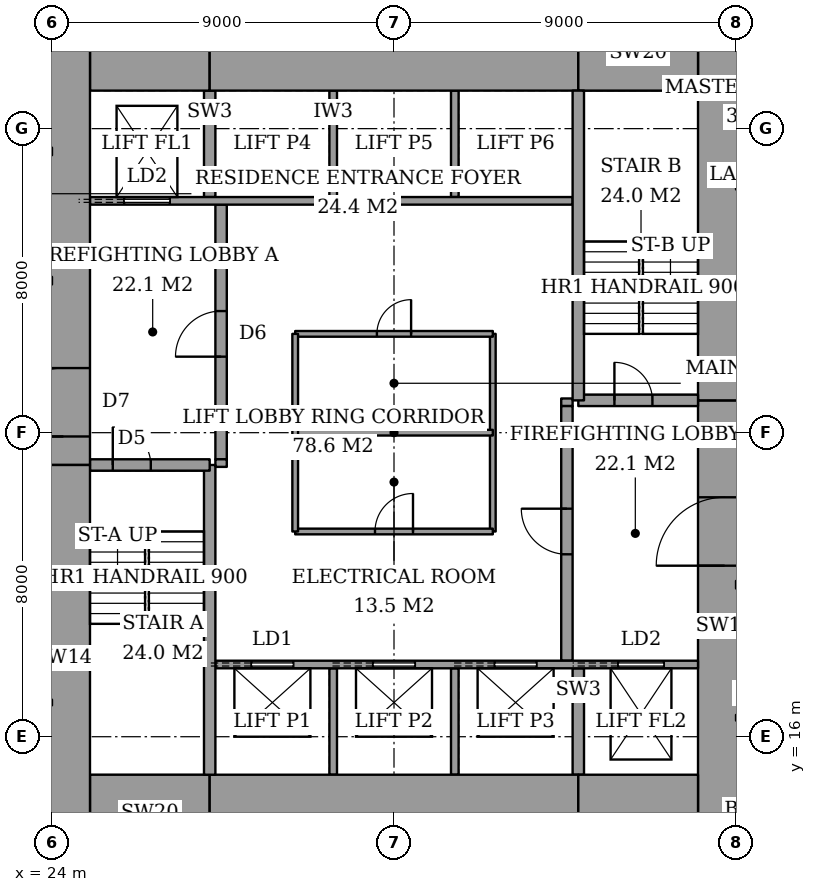
"""IFC4 building model, lengths in metres.
Left out: names, types, materials, properties, quantities, classifications, styles, units other than length and angle.
Written with IfcOpenShell. Run it as: python <this file> out.ifc"""

import sys

from ifc_helpers import new_model, si_unit, direction, frame, frame_2d, origin, place, context, subcontext, project, spatial, rectangle, extrude, element, fill, save


model = new_model("IFC4")
c1 = context("Model", 3, precision=1e-05, world=origin(), true_north=direction((0.0, 1.0)))
c2 = subcontext(c1, "Body", "Model", "MODEL_VIEW")
j1 = project(units=[si_unit("LENGTHUNIT", "METRE"), si_unit("PLANEANGLEUNIT", "RADIAN")], contexts=[c1])
p1 = place(None, origin())
s1 = spatial("IfcSite", under=j1, at=p1, CompositionType="ELEMENT")
p2 = place(p1, origin())
s2 = spatial("IfcBuilding", under=s1, at=p2, CompositionType="ELEMENT")
p3 = place(p2, frame((0.0, 0.0, 58.4)))
s3 = spatial("IfcBuildingStorey", under=s2, at=p3, CompositionType="ELEMENT", Elevation=58.4)
p4 = place(p3, frame((25.0, 14.0, 0.0), z_axis=(0.0, 0.0, 1.0), x_axis=(1.0, 0.0, 0.0)))
e1 = element("IfcWall", 1, at=p4, inside=s3, PredefinedType="SHEAR", context=c2, shape_type="SweptSolid", body=[
    extrude(rectangle(XDim=3.15, YDim=2.0, at=frame_2d((1.575, 0.0))), origin(), (0.0, 0.0, 1.0), 3.6),
])
p5 = place(p3, frame((28.15, 14.0, 0.0), z_axis=(0.0, 0.0, 1.0), x_axis=(1.0, 0.0, 0.0)))
e2 = element("IfcWall", 2, at=p5, inside=s3, PredefinedType="SHEAR", context=c2, shape_type="SweptSolid", body=[
    extrude(rectangle(XDim=9.7, YDim=2.0, at=frame_2d((4.85, 0.0))), origin(), (0.0, 0.0, 1.0), 3.6),
])
for number, where, z_axis, x_axis in (
    (3, (37.85, 14.0, 0.0), (0.0, 0.0, 1.0), (1.0, 0.0, 0.0)),
    (4, (25.0, 34.0, 0.0), (0.0, 0.0, 1.0), (1.0, 0.0, 0.0)),
):
    element("IfcWall", number, at=place(p3, frame(where, z_axis=z_axis, x_axis=x_axis)), inside=s3, PredefinedType="SHEAR", context=c2, shape_type="SweptSolid", body=[
        extrude(rectangle(XDim=3.15, YDim=2.0, at=frame_2d((1.575, 0.0))), origin(), (0.0, 0.0, 1.0), 3.6),
    ])
p6 = place(p3, frame((28.15, 34.0, 0.0), z_axis=(0.0, 0.0, 1.0), x_axis=(1.0, 0.0, 0.0)))
e5 = element("IfcWall", 5, at=p6, inside=s3, PredefinedType="SHEAR", context=c2, shape_type="SweptSolid", body=[
    extrude(rectangle(XDim=9.7, YDim=2.0, at=frame_2d((4.85, 0.0))), origin(), (0.0, 0.0, 1.0), 3.6),
])
p7 = place(p3, frame((37.85, 34.0, 0.0), z_axis=(0.0, 0.0, 1.0), x_axis=(1.0, 0.0, 0.0)))
e6 = element("IfcWall", 6, at=p7, inside=s3, PredefinedType="SHEAR", context=c2, shape_type="SweptSolid", body=[
    extrude(rectangle(XDim=3.15, YDim=2.0, at=frame_2d((1.575, 0.0))), origin(), (0.0, 0.0, 1.0), 3.6),
])
p8 = place(p3, frame((24.3, 13.0, 0.0), z_axis=(0.0, 0.0, 1.0), x_axis=(0.0, 1.0, 0.0)))
e7 = element("IfcWall", 7, at=p8, inside=s3, PredefinedType="SHEAR", context=c2, shape_type="SweptSolid", body=[
    extrude(rectangle(XDim=10.15, YDim=1.4, at=frame_2d((5.075, 0.0))), origin(), (0.0, 0.0, 1.0), 3.6),
])
p9 = place(p3, frame((24.3, 23.15, 0.0), z_axis=(0.0, 0.0, 1.0), x_axis=(0.0, 1.0, 0.0)))
e8 = element("IfcWall", 8, at=p9, inside=s3, PredefinedType="SHEAR", context=c2, shape_type="SweptSolid", body=[
    extrude(rectangle(XDim=11.85, YDim=1.4, at=frame_2d((5.925, 0.0))), origin(), (0.0, 0.0, 1.0), 3.6),
])
p10 = place(p9, frame((0.75, 0.0, 0.0)))
e9 = element("IfcOpeningElement", 9, at=p10, cuts=e8, PredefinedType="OPENING", context=c2, shape_type="SweptSolid", body=[
    extrude(rectangle(XDim=1.8, YDim=2.4, at=frame_2d((0.9, 1.2))), frame((0.0, 0.71, 0.0), z_axis=(0.0, -1.0, 0.0), x_axis=(1.0, 0.0, 0.0)), (0.0, 0.0, 1.0), 1.42),
])
p11 = place(p3, frame((41.7, 13.0, 0.0), z_axis=(0.0, 0.0, 1.0), x_axis=(0.0, 1.0, 0.0)))
e10 = element("IfcWall", 10, at=p11, inside=s3, PredefinedType="SHEAR", context=c2, shape_type="SweptSolid", body=[
    extrude(rectangle(XDim=11.85, YDim=1.4, at=frame_2d((5.925, 0.0))), origin(), (0.0, 0.0, 1.0), 3.6),
])
p12 = place(p11, frame((7.5, 0.0, 0.0)))
e11 = element("IfcOpeningElement", 11, at=p12, cuts=e10, PredefinedType="OPENING", context=c2, shape_type="SweptSolid", body=[
    extrude(rectangle(XDim=1.8, YDim=2.4, at=frame_2d((0.9, 1.2))), frame((0.0, 0.71, 0.0), z_axis=(0.0, -1.0, 0.0), x_axis=(1.0, 0.0, 0.0)), (0.0, 0.0, 1.0), 1.42),
])
p13 = place(p3, frame((41.7, 24.85, 0.0), z_axis=(0.0, 0.0, 1.0), x_axis=(0.0, 1.0, 0.0)))
e12 = element("IfcWall", 12, at=p13, inside=s3, PredefinedType="SHEAR", context=c2, shape_type="SweptSolid", body=[
    extrude(rectangle(XDim=10.15, YDim=1.4, at=frame_2d((5.075, 0.0))), origin(), (0.0, 0.0, 1.0), 3.6),
])
p14 = place(p3, frame((28.15, 15.0, 0.0), z_axis=(0.0, 0.0, 1.0), x_axis=(0.0, 1.0, 0.0)))
e13 = element("IfcWall", 13, at=p14, inside=s3, PredefinedType="SHEAR", context=c2, shape_type="SweptSolid", body=[
    extrude(rectangle(XDim=8.15, YDim=0.3, at=frame_2d((4.075, 0.0))), origin(), (0.0, 0.0, 1.0), 3.6),
])
p15 = place(p3, frame((25.0, 23.15, 0.0), z_axis=(0.0, 0.0, 1.0), x_axis=(1.0, 0.0, 0.0)))
e14 = element("IfcWall", 14, at=p15, inside=s3, PredefinedType="SHEAR", context=c2, shape_type="SweptSolid", body=[
    extrude(rectangle(XDim=3.15, YDim=0.3, at=frame_2d((1.575, 0.0))), origin(), (0.0, 0.0, 1.0), 3.6),
])
p16 = place(p15, frame((0.6, 0.0, 0.0)))
e15 = element("IfcOpeningElement", 15, at=p16, cuts=e14, PredefinedType="OPENING", context=c2, shape_type="SweptSolid", body=[
    extrude(rectangle(XDim=1.0, YDim=2.1, at=frame_2d((0.5, 1.05))), frame((0.0, 0.16, 0.0), z_axis=(0.0, -1.0, 0.0), x_axis=(1.0, 0.0, 0.0)), (0.0, 0.0, 1.0), 0.32),
])
p17 = place(p3, frame((37.85, 24.85, 0.0), z_axis=(0.0, 0.0, 1.0), x_axis=(0.0, 1.0, 0.0)))
e16 = element("IfcWall", 16, at=p17, inside=s3, PredefinedType="SHEAR", context=c2, shape_type="SweptSolid", body=[
    extrude(rectangle(XDim=8.15, YDim=0.3, at=frame_2d((4.075, 0.0))), origin(), (0.0, 0.0, 1.0), 3.6),
])
p18 = place(p3, frame((37.85, 24.85, 0.0), z_axis=(0.0, 0.0, 1.0), x_axis=(1.0, 0.0, 0.0)))
e17 = element("IfcWall", 17, at=p18, inside=s3, PredefinedType="SHEAR", context=c2, shape_type="SweptSolid", body=[
    extrude(rectangle(XDim=3.15, YDim=0.3, at=frame_2d((1.575, 0.0))), origin(), (0.0, 0.0, 1.0), 3.6),
])
p19 = place(p18, frame((0.95, 0.0, 0.0)))
e18 = element("IfcOpeningElement", 18, at=p19, cuts=e17, PredefinedType="OPENING", context=c2, shape_type="SweptSolid", body=[
    extrude(rectangle(XDim=1.0, YDim=2.1, at=frame_2d((0.5, 1.05))), frame((0.0, 0.16, 0.0), z_axis=(0.0, -1.0, 0.0), x_axis=(1.0, 0.0, 0.0)), (0.0, 0.0, 1.0), 0.32),
])
p20 = place(p3, frame((28.45, 23.3, 0.0), z_axis=(0.0, 0.0, 1.0), x_axis=(0.0, 1.0, 0.0)))
e19 = element("IfcWall", 19, at=p20, inside=s3, PredefinedType="PARTITIONING", context=c2, shape_type="SweptSolid", body=[
    extrude(rectangle(XDim=6.7, YDim=0.3, at=frame_2d((3.35, 0.0))), origin(), (0.0, 0.0, 1.0), 3.6),
])
p21 = place(p20, frame((2.7, 0.0, 0.0)))
e20 = element("IfcOpeningElement", 20, at=p21, cuts=e19, PredefinedType="OPENING", context=c2, shape_type="SweptSolid", body=[
    extrude(rectangle(XDim=1.2, YDim=2.1, at=frame_2d((0.6, 1.05))), frame((0.0, 0.16, 0.0), z_axis=(0.0, -1.0, 0.0), x_axis=(1.0, 0.0, 0.0)), (0.0, 0.0, 1.0), 0.32),
])
p22 = place(p3, frame((37.55, 18.0, 0.0), z_axis=(0.0, 0.0, 1.0), x_axis=(0.0, 1.0, 0.0)))
e21 = element("IfcWall", 21, at=p22, inside=s3, PredefinedType="PARTITIONING", context=c2, shape_type="SweptSolid", body=[
    extrude(rectangle(XDim=6.7, YDim=0.3, at=frame_2d((3.35, 0.0))), origin(), (0.0, 0.0, 1.0), 3.6),
])
p23 = place(p22, frame((2.8, 0.0, 0.0)))
e22 = element("IfcOpeningElement", 22, at=p23, cuts=e21, PredefinedType="OPENING", context=c2, shape_type="SweptSolid", body=[
    extrude(rectangle(XDim=1.2, YDim=2.1, at=frame_2d((0.6, 1.05))), frame((0.0, 0.16, 0.0), z_axis=(0.0, -1.0, 0.0), x_axis=(1.0, 0.0, 0.0)), (0.0, 0.0, 1.0), 0.32),
])
p24 = place(p3, frame((28.3, 17.9, 0.0), z_axis=(0.0, 0.0, 1.0), x_axis=(1.0, 0.0, 0.0)))
e23 = element("IfcWall", 23, at=p24, inside=s3, PredefinedType="PARTITIONING", context=c2, shape_type="SweptSolid", body=[
    extrude(rectangle(XDim=12.7, YDim=0.2, at=frame_2d((6.35, 0.0))), origin(), (0.0, 0.0, 1.0), 3.6),
])
p25 = place(p24, frame((0.95, 0.0, 0.0)))
e24 = element("IfcOpeningElement", 24, at=p25, cuts=e23, PredefinedType="OPENING", context=c2, shape_type="SweptSolid", body=[
    extrude(rectangle(XDim=1.1, YDim=2.1, at=frame_2d((0.55, 1.05))), frame((0.0, 0.11, 0.0), z_axis=(0.0, -1.0, 0.0), x_axis=(1.0, 0.0, 0.0)), (0.0, 0.0, 1.0), 0.22),
])
p26 = place(p24, frame((4.15, 0.0, 0.0)))
e25 = element("IfcOpeningElement", 25, at=p26, cuts=e23, PredefinedType="OPENING", context=c2, shape_type="SweptSolid", body=[
    extrude(rectangle(XDim=1.1, YDim=2.1, at=frame_2d((0.55, 1.05))), frame((0.0, 0.11, 0.0), z_axis=(0.0, -1.0, 0.0), x_axis=(1.0, 0.0, 0.0)), (0.0, 0.0, 1.0), 0.22),
])
p27 = place(p24, frame((7.35, 0.0, 0.0)))
e26 = element("IfcOpeningElement", 26, at=p27, cuts=e23, PredefinedType="OPENING", context=c2, shape_type="SweptSolid", body=[
    extrude(rectangle(XDim=1.1, YDim=2.1, at=frame_2d((0.55, 1.05))), frame((0.0, 0.11, 0.0), z_axis=(0.0, -1.0, 0.0), x_axis=(1.0, 0.0, 0.0)), (0.0, 0.0, 1.0), 0.22),
])
p28 = place(p24, frame((10.6, 0.0, 0.0)))
e27 = element("IfcOpeningElement", 27, at=p28, cuts=e23, PredefinedType="OPENING", context=c2, shape_type="SweptSolid", body=[
    extrude(rectangle(XDim=1.2, YDim=2.1, at=frame_2d((0.6, 1.05))), frame((0.0, 0.11, 0.0), z_axis=(0.0, -1.0, 0.0), x_axis=(1.0, 0.0, 0.0)), (0.0, 0.0, 1.0), 0.22),
])
p29 = place(p3, frame((25.0, 30.1, 0.0), z_axis=(0.0, 0.0, 1.0), x_axis=(1.0, 0.0, 0.0)))
e28 = element("IfcWall", 28, at=p29, inside=s3, PredefinedType="PARTITIONING", context=c2, shape_type="SweptSolid", body=[
    extrude(rectangle(XDim=12.7, YDim=0.2, at=frame_2d((6.35, 0.0))), origin(), (0.0, 0.0, 1.0), 3.6),
])
p30 = place(p29, frame((0.9, 0.0, 0.0)))
e29 = element("IfcOpeningElement", 29, at=p30, cuts=e28, PredefinedType="OPENING", context=c2, shape_type="SweptSolid", body=[
    extrude(rectangle(XDim=1.2, YDim=2.1, at=frame_2d((0.6, 1.05))), frame((0.0, 0.11, 0.0), z_axis=(0.0, -1.0, 0.0), x_axis=(1.0, 0.0, 0.0)), (0.0, 0.0, 1.0), 0.22),
])
for number, where, z_axis, x_axis in (
    (30, (31.4, 15.0, 0.0), (0.0, 0.0, 1.0), (0.0, 1.0, 0.0)),
    (31, (34.6, 15.0, 0.0), (0.0, 0.0, 1.0), (0.0, 1.0, 0.0)),
):
    element("IfcWall", number, at=place(p3, frame(where, z_axis=z_axis, x_axis=x_axis)), inside=s3, PredefinedType="PARTITIONING", context=c2, shape_type="SweptSolid", body=[
        extrude(rectangle(XDim=2.8, YDim=0.2, at=frame_2d((1.4, 0.0))), origin(), (0.0, 0.0, 1.0), 3.6),
    ])
p31 = place(p3, frame((37.85, 15.0, 0.0), z_axis=(0.0, 0.0, 1.0), x_axis=(0.0, 1.0, 0.0)))
e32 = element("IfcWall", 32, at=p31, inside=s3, PredefinedType="SHEAR", context=c2, shape_type="SweptSolid", body=[
    extrude(rectangle(XDim=2.8, YDim=0.3, at=frame_2d((1.4, 0.0))), origin(), (0.0, 0.0, 1.0), 3.6),
])
for number, where, z_axis, x_axis in (
    (33, (31.4, 30.2, 0.0), (0.0, 0.0, 1.0), (0.0, 1.0, 0.0)),
    (34, (34.6, 30.2, 0.0), (0.0, 0.0, 1.0), (0.0, 1.0, 0.0)),
):
    element("IfcWall", number, at=place(p3, frame(where, z_axis=z_axis, x_axis=x_axis)), inside=s3, PredefinedType="PARTITIONING", context=c2, shape_type="SweptSolid", body=[
        extrude(rectangle(XDim=2.8, YDim=0.2, at=frame_2d((1.4, 0.0))), origin(), (0.0, 0.0, 1.0), 3.6),
    ])
p32 = place(p3, frame((28.15, 30.2, 0.0), z_axis=(0.0, 0.0, 1.0), x_axis=(0.0, 1.0, 0.0)))
e35 = element("IfcWall", 35, at=p32, inside=s3, PredefinedType="SHEAR", context=c2, shape_type="SweptSolid", body=[
    extrude(rectangle(XDim=2.8, YDim=0.3, at=frame_2d((1.4, 0.0))), origin(), (0.0, 0.0, 1.0), 3.6),
])
for number, where, z_axis, x_axis in (
    (36, (28.3, 23.2, 0.0), (0.0, 0.0, 1.0), (1.0, 0.0, 0.0)),
    (37, (37.4, 24.8, 0.0), (0.0, 0.0, 1.0), (1.0, 0.0, 0.0)),
):
    element("IfcWall", number, at=place(p3, frame(where, z_axis=z_axis, x_axis=x_axis)), inside=s3, PredefinedType="PARTITIONING", context=c2, shape_type="SweptSolid", body=[
        extrude(rectangle(XDim=0.3, YDim=0.2, at=frame_2d((0.15, 0.0))), origin(), (0.0, 0.0, 1.0), 3.6),
    ])
p33 = place(p3, frame((30.4, 21.4, 0.0), z_axis=(0.0, 0.0, 1.0), x_axis=(1.0, 0.0, 0.0)))
e38 = element("IfcWall", 38, at=p33, inside=s3, PredefinedType="PARTITIONING", context=c2, shape_type="SweptSolid", body=[
    extrude(rectangle(XDim=5.2, YDim=0.15, at=frame_2d((2.6, 0.0))), origin(), (0.0, 0.0, 1.0), 3.35),
])
p34 = place(p33, frame((2.1, 0.0, 0.0)))
e39 = element("IfcOpeningElement", 39, at=p34, cuts=e38, PredefinedType="OPENING", context=c2, shape_type="SweptSolid", body=[
    extrude(rectangle(XDim=1.0, YDim=2.1, at=frame_2d((0.5, 1.05))), frame((0.0, 0.085, 0.0), z_axis=(0.0, -1.0, 0.0), x_axis=(1.0, 0.0, 0.0)), (0.0, 0.0, 1.0), 0.17),
])
p35 = place(p3, frame((30.4, 26.6, 0.0), z_axis=(0.0, 0.0, 1.0), x_axis=(1.0, 0.0, 0.0)))
e40 = element("IfcWall", 40, at=p35, inside=s3, PredefinedType="PARTITIONING", context=c2, shape_type="SweptSolid", body=[
    extrude(rectangle(XDim=5.2, YDim=0.15, at=frame_2d((2.6, 0.0))), origin(), (0.0, 0.0, 1.0), 3.35),
])
p36 = place(p35, frame((2.15, 0.0, 0.0)))
e41 = element("IfcOpeningElement", 41, at=p36, cuts=e40, PredefinedType="OPENING", context=c2, shape_type="SweptSolid", body=[
    extrude(rectangle(XDim=0.9, YDim=2.1, at=frame_2d((0.45, 1.05))), frame((0.0, 0.085, 0.0), z_axis=(0.0, -1.0, 0.0), x_axis=(1.0, 0.0, 0.0)), (0.0, 0.0, 1.0), 0.17),
])
for number, where, z_axis, x_axis in (
    (42, (30.4, 21.4, 0.0), (0.0, 0.0, 1.0), (0.0, 1.0, 0.0)),
    (43, (35.6, 21.4, 0.0), (0.0, 0.0, 1.0), (0.0, 1.0, 0.0)),
    (44, (30.4, 24.0, 0.0), (0.0, 0.0, 1.0), (1.0, 0.0, 0.0)),
):
    element("IfcWall", number, at=place(p3, frame(where, z_axis=z_axis, x_axis=x_axis)), inside=s3, PredefinedType="PARTITIONING", context=c2, shape_type="SweptSolid", body=[
        extrude(rectangle(XDim=5.2, YDim=0.15, at=frame_2d((2.6, 0.0))), origin(), (0.0, 0.0, 1.0), 3.35),
    ])
p37 = place(p16, origin())
e45 = element("IfcDoor", 45, at=p37, inside=s3, OperationType="SINGLE_SWING_RIGHT", PredefinedType="DOOR", context=c2, shape_type="SweptSolid", body=[
    extrude(rectangle(XDim=1.0, YDim=2.1, at=frame_2d((0.5, 1.05))), frame((0.0, 0.025, 0.0), z_axis=(0.0, -1.0, 0.0), x_axis=(1.0, 0.0, 0.0)), (0.0, 0.0, 1.0), 0.05),
])
fill(e15, e45)
p38 = place(p19, origin())
e46 = element("IfcDoor", 46, at=p38, inside=s3, OperationType="SINGLE_SWING_RIGHT", PredefinedType="DOOR", context=c2, shape_type="SweptSolid", body=[
    extrude(rectangle(XDim=1.0, YDim=2.1, at=frame_2d((0.5, 1.05))), frame((0.0, 0.025, 0.0), z_axis=(0.0, -1.0, 0.0), x_axis=(1.0, 0.0, 0.0)), (0.0, 0.0, 1.0), 0.05),
])
fill(e18, e46)
p39 = place(p21, origin())
e47 = element("IfcDoor", 47, at=p39, inside=s3, OperationType="SINGLE_SWING_RIGHT", PredefinedType="DOOR", context=c2, shape_type="SweptSolid", body=[
    extrude(rectangle(XDim=1.2, YDim=2.1, at=frame_2d((0.6, 1.05))), frame((0.0, 0.025, 0.0), z_axis=(0.0, -1.0, 0.0), x_axis=(1.0, 0.0, 0.0)), (0.0, 0.0, 1.0), 0.05),
])
fill(e20, e47)
p40 = place(p23, origin())
e48 = element("IfcDoor", 48, at=p40, inside=s3, OperationType="SINGLE_SWING_LEFT", PredefinedType="DOOR", context=c2, shape_type="SweptSolid", body=[
    extrude(rectangle(XDim=1.2, YDim=2.1, at=frame_2d((0.6, 1.05))), frame((0.0, 0.025, 0.0), z_axis=(0.0, -1.0, 0.0), x_axis=(1.0, 0.0, 0.0)), (0.0, 0.0, 1.0), 0.05),
])
fill(e22, e48)
p41 = place(p10, origin())
e49 = element("IfcDoor", 49, at=p41, inside=s3, OperationType="DOUBLE_DOOR_DOUBLE_SWING", PredefinedType="DOOR", context=c2, shape_type="SweptSolid", body=[
    extrude(rectangle(XDim=1.8, YDim=2.4, at=frame_2d((0.9, 1.2))), frame((0.0, 0.025, 0.0), z_axis=(0.0, -1.0, 0.0), x_axis=(1.0, 0.0, 0.0)), (0.0, 0.0, 1.0), 0.05),
])
fill(e9, e49)
p42 = place(p12, origin())
e50 = element("IfcDoor", 50, at=p42, inside=s3, OperationType="DOUBLE_DOOR_DOUBLE_SWING", PredefinedType="DOOR", context=c2, shape_type="SweptSolid", body=[
    extrude(rectangle(XDim=1.8, YDim=2.4, at=frame_2d((0.9, 1.2))), frame((0.0, 0.025, 0.0), z_axis=(0.0, -1.0, 0.0), x_axis=(1.0, 0.0, 0.0)), (0.0, 0.0, 1.0), 0.05),
])
fill(e11, e50)
p43 = place(p34, origin())
e51 = element("IfcDoor", 51, at=p43, inside=s3, OperationType="SINGLE_SWING_LEFT", PredefinedType="DOOR", context=c2, shape_type="SweptSolid", body=[
    extrude(rectangle(XDim=1.0, YDim=2.1, at=frame_2d((0.5, 1.05))), frame((0.0, 0.025, 0.0), z_axis=(0.0, -1.0, 0.0), x_axis=(1.0, 0.0, 0.0)), (0.0, 0.0, 1.0), 0.05),
])
fill(e39, e51)
p44 = place(p36, origin())
e52 = element("IfcDoor", 52, at=p44, inside=s3, OperationType="SINGLE_SWING_LEFT", PredefinedType="DOOR", context=c2, shape_type="SweptSolid", body=[
    extrude(rectangle(XDim=0.9, YDim=2.1, at=frame_2d((0.45, 1.05))), frame((0.0, 0.025, 0.0), z_axis=(0.0, -1.0, 0.0), x_axis=(1.0, 0.0, 0.0)), (0.0, 0.0, 1.0), 0.05),
])
fill(e41, e52)
p45 = place(p25, origin())
e53 = element("IfcDoor", 53, at=p45, inside=s3, OperationType="SLIDING_TO_LEFT", PredefinedType="DOOR", context=c2, shape_type="SweptSolid", body=[
    extrude(rectangle(XDim=1.1, YDim=2.1, at=frame_2d((0.55, 1.05))), frame((0.0, 0.025, 0.0), z_axis=(0.0, -1.0, 0.0), x_axis=(1.0, 0.0, 0.0)), (0.0, 0.0, 1.0), 0.05),
])
fill(e24, e53)
p46 = place(p26, origin())
e54 = element("IfcDoor", 54, at=p46, inside=s3, OperationType="SLIDING_TO_LEFT", PredefinedType="DOOR", context=c2, shape_type="SweptSolid", body=[
    extrude(rectangle(XDim=1.1, YDim=2.1, at=frame_2d((0.55, 1.05))), frame((0.0, 0.025, 0.0), z_axis=(0.0, -1.0, 0.0), x_axis=(1.0, 0.0, 0.0)), (0.0, 0.0, 1.0), 0.05),
])
fill(e25, e54)
p47 = place(p27, origin())
e55 = element("IfcDoor", 55, at=p47, inside=s3, OperationType="SLIDING_TO_LEFT", PredefinedType="DOOR", context=c2, shape_type="SweptSolid", body=[
    extrude(rectangle(XDim=1.1, YDim=2.1, at=frame_2d((0.55, 1.05))), frame((0.0, 0.025, 0.0), z_axis=(0.0, -1.0, 0.0), x_axis=(1.0, 0.0, 0.0)), (0.0, 0.0, 1.0), 0.05),
])
fill(e26, e55)
p48 = place(p30, origin())
e56 = element("IfcDoor", 56, at=p48, inside=s3, OperationType="SLIDING_TO_LEFT", PredefinedType="DOOR", context=c2, shape_type="SweptSolid", body=[
    extrude(rectangle(XDim=1.2, YDim=2.1, at=frame_2d((0.6, 1.05))), frame((0.0, 0.025, 0.0), z_axis=(0.0, -1.0, 0.0), x_axis=(1.0, 0.0, 0.0)), (0.0, 0.0, 1.0), 0.05),
])
fill(e29, e56)
p49 = place(p28, origin())
e57 = element("IfcDoor", 57, at=p49, inside=s3, OperationType="SLIDING_TO_LEFT", PredefinedType="DOOR", context=c2, shape_type="SweptSolid", body=[
    extrude(rectangle(XDim=1.2, YDim=2.1, at=frame_2d((0.6, 1.05))), frame((0.0, 0.025, 0.0), z_axis=(0.0, -1.0, 0.0), x_axis=(1.0, 0.0, 0.0)), (0.0, 0.0, 1.0), 0.05),
])
fill(e27, e57)
save(model, sys.argv[1])
